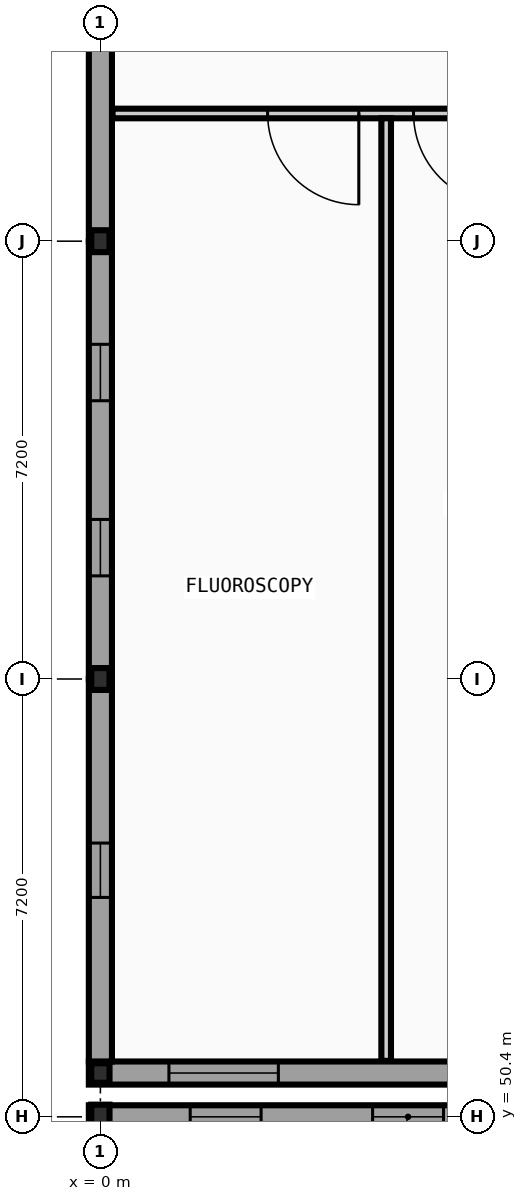
"""IFC4 building model, lengths in metres.
Left out: names, types, materials, properties, quantities, classifications, styles, units other than length and angle.
Written with IfcOpenShell. Run it as: python <this file> out.ifc"""

import sys

from ifc_helpers import new_model, si_unit, direction, frame, frame_2d, origin, origin_2d, place, context, subcontext, project, spatial, rectangle, i_section, extrude, element, fill, save


model = new_model("IFC4")
c1 = context("Model", 3, precision=1e-05, world=origin(), true_north=direction((0.0, 1.0)))
c2 = subcontext(c1, "Body", "Model", "MODEL_VIEW")
j1 = project(units=[si_unit("LENGTHUNIT", "METRE"), si_unit("PLANEANGLEUNIT", "RADIAN")], contexts=[c1])
p1 = place(None, origin())
s1 = spatial("IfcSite", under=j1, at=p1, CompositionType="ELEMENT")
p2 = place(p1, origin())
s2 = spatial("IfcBuilding", under=s1, at=p2, CompositionType="ELEMENT")
p3 = place(p2, frame((0.0, 0.0, 5.2)))
s3 = spatial("IfcBuildingStorey", under=s2, at=p3, CompositionType="ELEMENT", Elevation=5.2)
p4 = place(p3, frame((0.0, 50.4, 0.0), z_axis=(0.0, 0.0, 1.0), x_axis=(1.0, 0.0, 0.0)))
e1 = element("IfcColumn", 1, at=p4, inside=s3, PredefinedType="COLUMN", context=c2, shape_type="SweptSolid", body=[
    extrude(i_section(OverallWidth=0.3, OverallDepth=0.4, WebThickness=0.013, FlangeThickness=0.024, FilletRadius=0.027, at=origin_2d()), origin(), (0.0, 0.0, 1.0), 4.4),
])
p5 = place(p3, frame((0.0, 51.12, 0.0), z_axis=(0.0, 0.0, 1.0), x_axis=(1.0, 0.0, 0.0)))
e2 = element("IfcColumn", 2, at=p5, inside=s3, PredefinedType="COLUMN", context=c2, shape_type="SweptSolid", body=[
    extrude(i_section(OverallWidth=0.3, OverallDepth=0.32, WebThickness=0.011, FlangeThickness=0.021, FilletRadius=0.027, at=origin_2d()), origin(), (0.0, 0.0, 1.0), 4.4),
])
for number, where, z_axis, x_axis in (
    (3, (0.0, 57.6, 0.0), (0.0, 0.0, 1.0), (1.0, 0.0, 0.0)),
    (4, (0.0, 64.8, 0.0), (0.0, 0.0, 1.0), (1.0, 0.0, 0.0)),
):
    element("IfcColumn", number, at=place(p3, frame(where, z_axis=z_axis, x_axis=x_axis)), inside=s3, PredefinedType="COLUMN", context=c2, shape_type="SweptSolid", body=[
        extrude(i_section(OverallWidth=0.3, OverallDepth=0.36, WebThickness=0.012, FlangeThickness=0.022, FilletRadius=0.027, at=origin_2d()), origin(), (0.0, 0.0, 1.0), 4.4),
    ])
p6 = place(p3, frame((7.31, 50.4, 0.0), z_axis=(0.0, 0.0, 1.0), x_axis=(-1.0, 0.0, 0.0)))
e5 = element("IfcWall", 5, at=p6, inside=s3, PredefinedType="STANDARD", context=c2, shape_type="SweptSolid", body=[
    extrude(rectangle(XDim=7.5, YDim=0.38, at=frame_2d((3.75, 0.0))), origin(), (0.0, 0.0, 1.0), 3.88),
])
p7 = place(p6, frame((1.667, 0.0, 0.95)))
e6 = element("IfcOpeningElement", 6, at=p7, cuts=e5, PredefinedType="OPENING", context=c2, shape_type="SweptSolid", body=[
    extrude(rectangle(XDim=1.166, YDim=1.26, at=frame_2d((0.583, 0.63))), frame((0.0, 0.2, 0.0), z_axis=(0.0, -1.0, 0.0), x_axis=(1.0, 0.0, 0.0)), (0.0, 0.0, 1.0), 0.4),
])
p8 = place(p6, frame((4.667, 0.0, 0.95)))
e7 = element("IfcOpeningElement", 7, at=p8, cuts=e5, PredefinedType="OPENING", context=c2, shape_type="SweptSolid", body=[
    extrude(rectangle(XDim=1.166, YDim=1.26, at=frame_2d((0.583, 0.63))), frame((0.0, 0.2, 0.0), z_axis=(0.0, -1.0, 0.0), x_axis=(1.0, 0.0, 0.0)), (0.0, 0.0, 1.0), 0.4),
])
p9 = place(p3, frame((-0.19, 51.12, 0.0), z_axis=(0.0, 0.0, 1.0), x_axis=(1.0, 0.0, 0.0)))
e8 = element("IfcWall", 8, at=p9, inside=s3, PredefinedType="STANDARD", context=c2, shape_type="SweptSolid", body=[
    extrude(rectangle(XDim=7.39, YDim=0.38, at=frame_2d((3.695, 0.0))), origin(), (0.0, 0.0, 1.0), 3.88),
])
p10 = place(p9, frame((1.317, 0.0, 0.9)))
e9 = element("IfcOpeningElement", 9, at=p10, cuts=e8, PredefinedType="OPENING", context=c2, shape_type="SweptSolid", body=[
    extrude(rectangle(XDim=1.8, YDim=1.8, at=frame_2d((0.9, 0.9))), frame((0.0, 0.2, 0.0), z_axis=(0.0, -1.0, 0.0), x_axis=(1.0, 0.0, 0.0)), (0.0, 0.0, 1.0), 0.4),
])
p11 = place(p3, frame((0.0, 57.6, 0.0), z_axis=(0.0, 0.0, 1.0), x_axis=(0.0, -1.0, 0.0)))
e10 = element("IfcWall", 10, at=p11, inside=s3, PredefinedType="STANDARD", context=c2, shape_type="SweptSolid", body=[
    extrude(rectangle(XDim=6.29, YDim=0.38, at=frame_2d((3.145, 0.0))), origin(), (0.0, 0.0, 1.0), 3.81),
])
p12 = place(p11, frame((2.698, 0.0, 0.95)))
e11 = element("IfcOpeningElement", 11, at=p12, cuts=e10, PredefinedType="OPENING", context=c2, shape_type="SweptSolid", body=[
    extrude(rectangle(XDim=0.894, YDim=1.26, at=frame_2d((0.447, 0.63))), frame((0.0, 0.2, 0.0), z_axis=(0.0, -1.0, 0.0), x_axis=(1.0, 0.0, 0.0)), (0.0, 0.0, 1.0), 0.4),
])
p13 = place(p3, frame((0.0, 64.8, 0.0), z_axis=(0.0, 0.0, 1.0), x_axis=(0.0, -1.0, 0.0)))
e12 = element("IfcWall", 12, at=p13, inside=s3, PredefinedType="STANDARD", context=c2, shape_type="SweptSolid", body=[
    extrude(rectangle(XDim=7.2, YDim=0.38, at=frame_2d((3.6, 0.0))), origin(), (0.0, 0.0, 1.0), 3.81),
])
p14 = place(p13, frame((1.696, 0.0, 0.95)))
e13 = element("IfcOpeningElement", 13, at=p14, cuts=e12, PredefinedType="OPENING", context=c2, shape_type="SweptSolid", body=[
    extrude(rectangle(XDim=0.928, YDim=1.26, at=frame_2d((0.464, 0.63))), frame((0.0, 0.2, 0.0), z_axis=(0.0, -1.0, 0.0), x_axis=(1.0, 0.0, 0.0)), (0.0, 0.0, 1.0), 0.4),
])
p15 = place(p13, frame((4.576, 0.0, 0.95)))
e14 = element("IfcOpeningElement", 14, at=p15, cuts=e12, PredefinedType="OPENING", context=c2, shape_type="SweptSolid", body=[
    extrude(rectangle(XDim=0.928, YDim=1.26, at=frame_2d((0.464, 0.63))), frame((0.0, 0.2, 0.0), z_axis=(0.0, -1.0, 0.0), x_axis=(1.0, 0.0, 0.0)), (0.0, 0.0, 1.0), 0.4),
])
p16 = place(p3, frame((0.0, 72.0, 0.0), z_axis=(0.0, 0.0, 1.0), x_axis=(0.0, -1.0, 0.0)))
e15 = element("IfcWall", 15, at=p16, inside=s3, PredefinedType="STANDARD", context=c2, shape_type="SweptSolid", body=[
    extrude(rectangle(XDim=7.2, YDim=0.38, at=frame_2d((3.6, 0.0))), origin(), (0.0, 0.0, 1.0), 3.81),
])
p17 = place(p3, frame((0.2, 66.9, 0.0), z_axis=(0.0, 0.0, 1.0), x_axis=(1.0, 0.0, 0.0)))
e16 = element("IfcWall", 16, at=p17, inside=s3, PredefinedType="PARTITIONING", context=c2, shape_type="SweptSolid", body=[
    extrude(rectangle(XDim=9.0, YDim=0.158, at=frame_2d((4.5, 0.0))), origin(), (0.0, 0.0, 1.0), 4.185),
])
p18 = place(p17, frame((4.95, 0.0, 0.0)))
e17 = element("IfcOpeningElement", 17, at=p18, cuts=e16, PredefinedType="OPENING", context=c2, shape_type="SweptSolid", body=[
    extrude(rectangle(XDim=1.5, YDim=2.2, at=frame_2d((0.75, 1.1))), frame((0.0, 0.089, 0.0), z_axis=(0.0, -1.0, 0.0), x_axis=(1.0, 0.0, 0.0)), (0.0, 0.0, 1.0), 0.178),
])
p19 = place(p17, frame((2.55, 0.0, 0.0)))
e18 = element("IfcOpeningElement", 18, at=p19, cuts=e16, PredefinedType="OPENING", context=c2, shape_type="SweptSolid", body=[
    extrude(rectangle(XDim=1.5, YDim=2.2, at=frame_2d((0.75, 1.1))), frame((0.0, 0.089, 0.0), z_axis=(0.0, -1.0, 0.0), x_axis=(1.0, 0.0, 0.0)), (0.0, 0.0, 1.0), 0.178),
])
p20 = place(p3, frame((4.7, 51.32, 0.0), z_axis=(0.0, 0.0, 1.0), x_axis=(0.0, 1.0, 0.0)))
e19 = element("IfcWall", 19, at=p20, inside=s3, PredefinedType="PARTITIONING", context=c2, shape_type="SweptSolid", body=[
    extrude(rectangle(XDim=15.501, YDim=0.158, at=frame_2d((7.75, 0.0))), origin(), (0.0, 0.0, 1.0), 3.9),
])
p21 = place(p7, origin())
e20 = element("IfcWindow", 20, at=p21, inside=s3, PartitioningType="SINGLE_PANEL", PredefinedType="WINDOW", context=c2, shape_type="SweptSolid", body=[
    extrude(rectangle(XDim=1.166, YDim=1.26, at=frame_2d((0.583, 0.63))), frame((0.0, 0.03, 0.0), z_axis=(0.0, -1.0, 0.0), x_axis=(1.0, 0.0, 0.0)), (0.0, 0.0, 1.0), 0.06),
])
fill(e6, e20)
p22 = place(p8, origin())
e21 = element("IfcWindow", 21, at=p22, inside=s3, PartitioningType="SINGLE_PANEL", PredefinedType="WINDOW", context=c2, shape_type="SweptSolid", body=[
    extrude(rectangle(XDim=1.166, YDim=1.26, at=frame_2d((0.583, 0.63))), frame((0.0, 0.03, 0.0), z_axis=(0.0, -1.0, 0.0), x_axis=(1.0, 0.0, 0.0)), (0.0, 0.0, 1.0), 0.06),
])
fill(e7, e21)
p23 = place(p10, origin())
e22 = element("IfcWindow", 22, at=p23, inside=s3, PartitioningType="SINGLE_PANEL", PredefinedType="WINDOW", context=c2, shape_type="SweptSolid", body=[
    extrude(rectangle(XDim=1.8, YDim=1.8, at=frame_2d((0.9, 0.9))), frame((0.0, 0.03, 0.0), z_axis=(0.0, -1.0, 0.0), x_axis=(1.0, 0.0, 0.0)), (0.0, 0.0, 1.0), 0.06),
])
fill(e9, e22)
p24 = place(p12, origin())
e23 = element("IfcWindow", 23, at=p24, inside=s3, PartitioningType="SINGLE_PANEL", PredefinedType="WINDOW", context=c2, shape_type="SweptSolid", body=[
    extrude(rectangle(XDim=0.894, YDim=1.26, at=frame_2d((0.447, 0.63))), frame((0.0, 0.03, 0.0), z_axis=(0.0, -1.0, 0.0), x_axis=(1.0, 0.0, 0.0)), (0.0, 0.0, 1.0), 0.06),
])
fill(e11, e23)
p25 = place(p14, origin())
e24 = element("IfcWindow", 24, at=p25, inside=s3, PartitioningType="SINGLE_PANEL", PredefinedType="WINDOW", context=c2, shape_type="SweptSolid", body=[
    extrude(rectangle(XDim=0.928, YDim=1.26, at=frame_2d((0.464, 0.63))), frame((0.0, 0.03, 0.0), z_axis=(0.0, -1.0, 0.0), x_axis=(1.0, 0.0, 0.0)), (0.0, 0.0, 1.0), 0.06),
])
fill(e13, e24)
p26 = place(p15, origin())
e25 = element("IfcWindow", 25, at=p26, inside=s3, PartitioningType="SINGLE_PANEL", PredefinedType="WINDOW", context=c2, shape_type="SweptSolid", body=[
    extrude(rectangle(XDim=0.928, YDim=1.26, at=frame_2d((0.464, 0.63))), frame((0.0, 0.03, 0.0), z_axis=(0.0, -1.0, 0.0), x_axis=(1.0, 0.0, 0.0)), (0.0, 0.0, 1.0), 0.06),
])
fill(e14, e25)
p27 = place(p18, origin())
e26 = element("IfcDoor", 26, at=p27, inside=s3, OperationType="DOUBLE_DOOR_SINGLE_SWING", PredefinedType="DOOR", context=c2, shape_type="SweptSolid", body=[
    extrude(rectangle(XDim=1.5, YDim=2.2, at=frame_2d((0.75, 1.1))), frame((0.0, 0.025, 0.0), z_axis=(0.0, -1.0, 0.0), x_axis=(1.0, 0.0, 0.0)), (0.0, 0.0, 1.0), 0.05),
])
fill(e17, e26)
p28 = place(p19, origin())
e27 = element("IfcDoor", 27, at=p28, inside=s3, OperationType="DOUBLE_DOOR_SINGLE_SWING", PredefinedType="DOOR", context=c2, shape_type="SweptSolid", body=[
    extrude(rectangle(XDim=1.5, YDim=2.2, at=frame_2d((0.75, 1.1))), frame((0.0, 0.025, 0.0), z_axis=(0.0, -1.0, 0.0), x_axis=(1.0, 0.0, 0.0)), (0.0, 0.0, 1.0), 0.05),
])
fill(e18, e27)
save(model, sys.argv[1])
